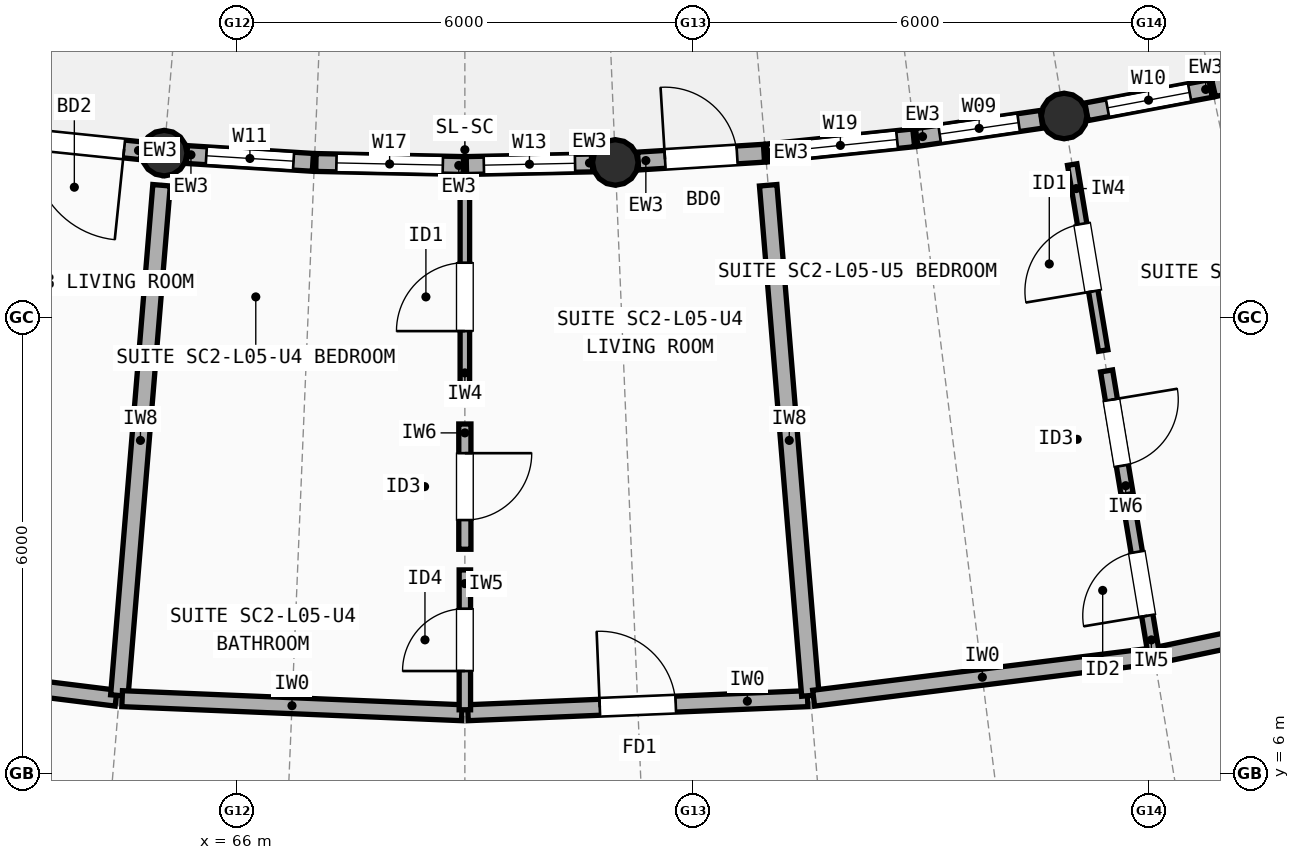
"""IFC4 building model, lengths in metres.
Left out: names, types, materials, properties, quantities, classifications, styles, units other than length and angle.
Written with IfcOpenShell. Run it as: python <this file> out.ifc"""

import sys

from ifc_helpers import new_model, si_unit, direction, frame, frame_2d, origin, origin_2d, place, context, subcontext, project, spatial, rectangle, circle, extrude, element, fill, save


model = new_model("IFC4")
c1 = context("Model", 3, precision=1e-05, world=origin(), true_north=direction((0.0, 1.0)))
c2 = subcontext(c1, "Body", "Model", "MODEL_VIEW")
j1 = project(units=[si_unit("LENGTHUNIT", "METRE"), si_unit("PLANEANGLEUNIT", "RADIAN")], contexts=[c1])
p1 = place(None, origin())
s1 = spatial("IfcSite", under=j1, at=p1, CompositionType="ELEMENT")
p2 = place(p1, origin())
s2 = spatial("IfcBuilding", under=s1, at=p2, CompositionType="ELEMENT")
p3 = place(p2, frame((0.0, 0.0, 17.3)))
s3 = spatial("IfcBuildingStorey", under=s2, at=p3, CompositionType="ELEMENT", Elevation=17.3)
for number, where, z_axis, x_axis in (
    (1, (65.044, 14.163, 0.0), (0.0, 0.0, 1.0), (1.0, 0.0, 0.0)),
    (2, (70.979, 14.041, 0.0), (0.0, 0.0, 1.0), (1.0, 0.0, 0.0)),
    (3, (76.885, 14.652, 0.0), (0.0, 0.0, 1.0), (1.0, 0.0, 0.0)),
):
    element("IfcColumn", number, at=place(p3, frame(where, z_axis=z_axis, x_axis=x_axis)), inside=s3, PredefinedType="COLUMN", context=c2, shape_type="SweptSolid", body=[
        extrude(circle(Radius=0.3, at=origin_2d()), origin(), (0.0, 0.0, 1.0), 2.94),
    ])
p4 = place(p3, frame((63.094, 14.365, 0.0), z_axis=(0.0, 0.0, 1.0), x_axis=(0.994687640844, -0.102939288674, 0.0)))
e4 = element("IfcWall", 4, at=p4, inside=s3, PredefinedType="STANDARD", context=c2, shape_type="SweptSolid", body=[
    extrude(rectangle(XDim=1.66, YDim=0.235, at=frame_2d((0.83, 0.0))), origin(), (0.0, 0.0, 1.0), 2.676),
])
p5 = place(p4, frame((0.23, 0.0, 0.0)))
e5 = element("IfcOpeningElement", 5, at=p5, cuts=e4, PredefinedType="OPENING", context=c2, shape_type="SweptSolid", body=[
    extrude(rectangle(XDim=1.2, YDim=2.15, at=frame_2d((0.6, 1.075))), frame((0.0, 0.127, 0.0), z_axis=(0.0, -1.0, 0.0), x_axis=(1.0, 0.0, 0.0)), (0.0, 0.0, 1.0), 0.255),
])
p6 = place(p3, frame((65.344, 14.145, 0.0), z_axis=(0.0, 0.0, 1.0), x_axis=(0.998081651949, -0.061911356339, 0.0)))
e6 = element("IfcWall", 6, at=p6, inside=s3, PredefinedType="STANDARD", context=c2, shape_type="SweptSolid", body=[
    extrude(rectangle(XDim=1.66, YDim=0.235, at=frame_2d((0.83, 0.0))), origin(), (0.0, 0.0, 1.0), 2.676),
])
p7 = place(p6, frame((0.255, 0.0, 0.85)))
e7 = element("IfcOpeningElement", 7, at=p7, cuts=e6, PredefinedType="OPENING", context=c2, shape_type="SweptSolid", body=[
    extrude(rectangle(XDim=1.15, YDim=1.45, at=frame_2d((0.575, 0.725))), frame((0.0, 0.127, 0.0), z_axis=(0.0, -1.0, 0.0), x_axis=(1.0, 0.0, 0.0)), (0.0, 0.0, 1.0), 0.255),
])
p8 = place(p3, frame((67.04, 14.04, 0.0), z_axis=(0.0, 0.0, 1.0), x_axis=(0.999789612304, -0.020511731505, 0.0)))
e8 = element("IfcWall", 8, at=p8, inside=s3, PredefinedType="STANDARD", context=c2, shape_type="SweptSolid", body=[
    extrude(rectangle(XDim=1.94, YDim=0.235, at=frame_2d((0.97, 0.0))), origin(), (0.0, 0.0, 1.0), 2.676),
])
p9 = place(p8, frame((0.27, 0.0, 0.85)))
e9 = element("IfcOpeningElement", 9, at=p9, cuts=e8, PredefinedType="OPENING", context=c2, shape_type="SweptSolid", body=[
    extrude(rectangle(XDim=1.4, YDim=1.5, at=frame_2d((0.7, 0.75))), frame((0.0, 0.127, 0.0), z_axis=(0.0, -1.0, 0.0), x_axis=(1.0, 0.0, 0.0)), (0.0, 0.0, 1.0), 0.255),
])
p10 = place(p3, frame((69.02, 14.0, 0.0), z_axis=(0.0, 0.0, 1.0), x_axis=(0.999788004991, 0.020589926552, 0.0)))
e10 = element("IfcWall", 10, at=p10, inside=s3, PredefinedType="STANDARD", context=c2, shape_type="SweptSolid", body=[
    extrude(rectangle(XDim=1.66, YDim=0.235, at=frame_2d((0.83, 0.0))), origin(), (0.0, 0.0, 1.0), 2.676),
])
p11 = place(p10, frame((0.23, 0.0, 0.85)))
e11 = element("IfcOpeningElement", 11, at=p11, cuts=e10, PredefinedType="OPENING", context=c2, shape_type="SweptSolid", body=[
    extrude(rectangle(XDim=1.2, YDim=1.45, at=frame_2d((0.6, 0.725))), frame((0.0, 0.127, 0.0), z_axis=(0.0, -1.0, 0.0), x_axis=(1.0, 0.0, 0.0)), (0.0, 0.0, 1.0), 0.255),
])
p12 = place(p3, frame((71.279, 14.059, 0.0), z_axis=(0.0, 0.0, 1.0), x_axis=(0.998081088149, 0.061920444756, 0.0)))
e12 = element("IfcWall", 12, at=p12, inside=s3, PredefinedType="STANDARD", context=c2, shape_type="SweptSolid", body=[
    extrude(rectangle(XDim=1.66, YDim=0.235, at=frame_2d((0.83, 0.0))), origin(), (0.0, 0.0, 1.0), 2.676),
])
p13 = place(p12, frame((0.355, 0.0, 0.0)))
e13 = element("IfcOpeningElement", 13, at=p13, cuts=e12, PredefinedType="OPENING", context=c2, shape_type="SweptSolid", body=[
    extrude(rectangle(XDim=0.95, YDim=2.12, at=frame_2d((0.475, 1.06))), frame((0.0, 0.127, 0.0), z_axis=(0.0, -1.0, 0.0), x_axis=(1.0, 0.0, 0.0)), (0.0, 0.0, 1.0), 0.255),
])
p14 = place(p3, frame((72.976, 14.165, 0.0), z_axis=(0.0, 0.0, 1.0), x_axis=(0.994688684624, 0.10292920228, 0.0)))
e14 = element("IfcWall", 14, at=p14, inside=s3, PredefinedType="STANDARD", context=c2, shape_type="SweptSolid", body=[
    extrude(rectangle(XDim=1.94, YDim=0.235, at=frame_2d((0.97, 0.0))), origin(), (0.0, 0.0, 1.0), 2.676),
])
p15 = place(p14, frame((0.22, 0.0, 0.85)))
e15 = element("IfcOpeningElement", 15, at=p15, cuts=e14, PredefinedType="OPENING", context=c2, shape_type="SweptSolid", body=[
    extrude(rectangle(XDim=1.5, YDim=1.5, at=frame_2d((0.75, 0.75))), frame((0.0, 0.127, 0.0), z_axis=(0.0, -1.0, 0.0), x_axis=(1.0, 0.0, 0.0)), (0.0, 0.0, 1.0), 0.255),
])
p16 = place(p3, frame((74.945, 14.37, 0.0), z_axis=(0.0, 0.0, 1.0), x_axis=(0.989602429917, 0.14382986721, 0.0)))
e16 = element("IfcWall", 16, at=p16, inside=s3, PredefinedType="STANDARD", context=c2, shape_type="SweptSolid", body=[
    extrude(rectangle(XDim=1.66, YDim=0.235, at=frame_2d((0.83, 0.0))), origin(), (0.0, 0.0, 1.0), 2.676),
])
p17 = place(p16, frame((0.305, 0.0, 0.85)))
e17 = element("IfcOpeningElement", 17, at=p17, cuts=e16, PredefinedType="OPENING", context=c2, shape_type="SweptSolid", body=[
    extrude(rectangle(XDim=1.05, YDim=1.35, at=frame_2d((0.525, 0.675))), frame((0.0, 0.127, 0.0), z_axis=(0.0, -1.0, 0.0), x_axis=(1.0, 0.0, 0.0)), (0.0, 0.0, 1.0), 0.255),
])
p18 = place(p3, frame((77.179, 14.708, 0.0), z_axis=(0.0, 0.0, 1.0), x_axis=(0.982820537681, 0.184563784945, 0.0)))
e18 = element("IfcWall", 18, at=p18, inside=s3, PredefinedType="STANDARD", context=c2, shape_type="SweptSolid", body=[
    extrude(rectangle(XDim=1.66, YDim=0.235, at=frame_2d((0.83, 0.0))), origin(), (0.0, 0.0, 1.0), 2.676),
])
p19 = place(p18, frame((0.28, 0.0, 0.85)))
e19 = element("IfcOpeningElement", 19, at=p19, cuts=e18, PredefinedType="OPENING", context=c2, shape_type="SweptSolid", body=[
    extrude(rectangle(XDim=1.1, YDim=1.45, at=frame_2d((0.55, 0.725))), frame((0.0, 0.127, 0.0), z_axis=(0.0, -1.0, 0.0), x_axis=(1.0, 0.0, 0.0)), (0.0, 0.0, 1.0), 0.255),
])
p20 = place(p3, frame((78.85, 15.022, 0.0), z_axis=(0.0, 0.0, 1.0), x_axis=(0.974359373104, 0.224997360081, 0.0)))
e20 = element("IfcWall", 20, at=p20, inside=s3, PredefinedType="STANDARD", context=c2, shape_type="SweptSolid", body=[
    extrude(rectangle(XDim=1.94, YDim=0.235, at=frame_2d((0.97, 0.0))), origin(), (0.0, 0.0, 1.0), 2.676),
])
p21 = place(p20, frame((0.47, 0.0, 0.0)))
e21 = element("IfcOpeningElement", 21, at=p21, cuts=e20, PredefinedType="OPENING", context=c2, shape_type="SweptSolid", body=[
    extrude(rectangle(XDim=1.0, YDim=2.15, at=frame_2d((0.5, 1.075))), frame((0.0, 0.127, 0.0), z_axis=(0.0, -1.0, 0.0), x_axis=(1.0, 0.0, 0.0)), (0.0, 0.0, 1.0), 0.255),
])
p22 = place(p3, frame((59.972, 7.545, 0.0), z_axis=(0.0, 0.0, 1.0), x_axis=(0.992349920368, -0.123457019023, 0.0)))
e22 = element("IfcWall", 22, at=p22, inside=s3, PredefinedType="SOLIDWALL", context=c2, shape_type="SweptSolid", body=[
    extrude(rectangle(XDim=4.473, YDim=0.21, at=frame_2d((2.237, 0.0))), origin(), (0.0, 0.0, 1.0), 2.714),
])
p23 = place(p22, frame((1.712, 0.0, 0.0)))
e23 = element("IfcOpeningElement", 23, at=p23, cuts=e22, PredefinedType="OPENING", context=c2, shape_type="SweptSolid", body=[
    extrude(rectangle(XDim=1.05, YDim=2.15, at=frame_2d((0.525, 1.075))), frame((0.0, 0.115, 0.0), z_axis=(0.0, -1.0, 0.0), x_axis=(1.0, 0.0, 0.0)), (0.0, 0.0, 1.0), 0.23),
])
p24 = place(p3, frame((65.009, 13.741, 0.0), z_axis=(0.0, 0.0, 1.0), x_axis=(-0.082418569382, -0.996597802236, 0.0)))
e24 = element("IfcWall", 24, at=p24, inside=s3, PredefinedType="SOLIDWALL", context=c2, shape_type="SweptSolid", body=[
    extrude(rectangle(XDim=6.736, YDim=0.23, at=frame_2d((3.368, 0.0))), origin(), (0.0, 0.0, 1.0), 2.734),
])
p25 = place(p3, frame((64.491, 6.986, 0.0), z_axis=(0.0, 0.0, 1.0), x_axis=(0.999148329529, -0.041262762871, 0.0)))
e25 = element("IfcWall", 25, at=p25, inside=s3, PredefinedType="SOLIDWALL", context=c2, shape_type="SweptSolid", body=[
    extrude(rectangle(XDim=4.473, YDim=0.21, at=frame_2d((2.237, 0.0))), origin(), (0.0, 0.0, 1.0), 2.754),
])
p26 = place(p3, frame((69.04, 6.802, 0.0), z_axis=(0.0, 0.0, 1.0), x_axis=(0.999148329529, 0.041262762871, 0.0)))
e26 = element("IfcWall", 26, at=p26, inside=s3, PredefinedType="SOLIDWALL", context=c2, shape_type="SweptSolid", body=[
    extrude(rectangle(XDim=4.473, YDim=0.21, at=frame_2d((2.237, 0.0))), origin(), (0.0, 0.0, 1.0), 2.734),
])
p27 = place(p26, frame((1.737, 0.0, 0.0)))
e27 = element("IfcOpeningElement", 27, at=p27, cuts=e26, PredefinedType="OPENING", context=c2, shape_type="SweptSolid", body=[
    extrude(rectangle(XDim=1.0, YDim=2.15, at=frame_2d((0.5, 1.075))), frame((0.0, 0.115, 0.0), z_axis=(0.0, -1.0, 0.0), x_axis=(1.0, 0.0, 0.0)), (0.0, 0.0, 1.0), 0.23),
])
p28 = place(p3, frame((69.0, 13.672, 0.0), z_axis=(0.0, 0.0, 1.0), x_axis=(0.0, -1.0, 0.0)))
e28 = element("IfcWall", 28, at=p28, inside=s3, PredefinedType="PARTITIONING", context=c2, shape_type="SweptSolid", body=[
    extrude(rectangle(XDim=2.8, YDim=0.125, at=frame_2d((1.4, 0.0))), origin(), (0.0, 0.0, 1.0), 2.714),
])
p29 = place(p28, frame((0.95, 0.0, 0.0)))
e29 = element("IfcOpeningElement", 29, at=p29, cuts=e28, PredefinedType="OPENING", context=c2, shape_type="SweptSolid", body=[
    extrude(rectangle(XDim=0.9, YDim=2.1, at=frame_2d((0.45, 1.05))), frame((0.0, 0.073, 0.0), z_axis=(0.0, -1.0, 0.0), x_axis=(1.0, 0.0, 0.0)), (0.0, 0.0, 1.0), 0.145),
])
p30 = place(p3, frame((69.0, 10.6, 0.0), z_axis=(0.0, 0.0, 1.0), x_axis=(0.0, -1.0, 0.0)))
e30 = element("IfcWall", 30, at=p30, inside=s3, PredefinedType="PLUMBINGWALL", context=c2, shape_type="SweptSolid", body=[
    extrude(rectangle(XDim=1.648, YDim=0.16, at=frame_2d((0.824, 0.0))), origin(), (0.0, 0.0, 1.0), 2.714),
])
p31 = place(p30, frame((0.384, 0.0, 0.0)))
e31 = element("IfcOpeningElement", 31, at=p31, cuts=e30, PredefinedType="OPENING", context=c2, shape_type="SweptSolid", body=[
    extrude(rectangle(XDim=0.88, YDim=2.1, at=frame_2d((0.44, 1.05))), frame((0.0, 0.09, 0.0), z_axis=(0.0, -1.0, 0.0), x_axis=(1.0, 0.0, 0.0)), (0.0, 0.0, 1.0), 0.18),
])
p32 = place(p3, frame((69.0, 8.68, 0.0), z_axis=(0.0, 0.0, 1.0), x_axis=(0.0, -1.0, 0.0)))
e32 = element("IfcWall", 32, at=p32, inside=s3, PredefinedType="PARTITIONING", context=c2, shape_type="SweptSolid", body=[
    extrude(rectangle(XDim=1.84, YDim=0.15, at=frame_2d((0.92, 0.0))), origin(), (0.0, 0.0, 1.0), 2.714),
])
p33 = place(p32, frame((0.51, 0.0, 0.0)))
e33 = element("IfcOpeningElement", 33, at=p33, cuts=e32, PredefinedType="OPENING", context=c2, shape_type="SweptSolid", body=[
    extrude(rectangle(XDim=0.82, YDim=2.08, at=frame_2d((0.41, 1.04))), frame((0.0, 0.085, 0.0), z_axis=(0.0, -1.0, 0.0), x_axis=(1.0, 0.0, 0.0)), (0.0, 0.0, 1.0), 0.17),
])
p34 = place(p3, frame((72.991, 13.741, 0.0), z_axis=(0.0, 0.0, 1.0), x_axis=(0.082418569382, -0.996597802236, 0.0)))
e34 = element("IfcWall", 34, at=p34, inside=s3, PredefinedType="SOLIDWALL", context=c2, shape_type="SweptSolid", body=[
    extrude(rectangle(XDim=6.736, YDim=0.23, at=frame_2d((3.368, 0.0))), origin(), (0.0, 0.0, 1.0), 2.754),
])
p35 = place(p3, frame((73.589, 6.993, 0.0), z_axis=(0.0, 0.0, 1.0), x_axis=(0.992349088432, 0.123463705959, 0.0)))
e35 = element("IfcWall", 35, at=p35, inside=s3, PredefinedType="SOLIDWALL", context=c2, shape_type="SweptSolid", body=[
    extrude(rectangle(XDim=4.473, YDim=0.21, at=frame_2d((2.236, 0.0))), origin(), (0.0, 0.0, 1.0), 2.714),
])
p36 = place(p3, frame((78.107, 7.558, 0.0), z_axis=(0.0, 0.0, 1.0), x_axis=(0.978806148413, 0.204788973894, 0.0)))
e36 = element("IfcWall", 36, at=p36, inside=s3, PredefinedType="SOLIDWALL", context=c2, shape_type="SweptSolid", body=[
    extrude(rectangle(XDim=4.473, YDim=0.21, at=frame_2d((2.236, 0.0))), origin(), (0.0, 0.0, 1.0), 2.754),
])
p37 = place(p36, frame((1.747, 0.0, 0.0)))
e37 = element("IfcOpeningElement", 37, at=p37, cuts=e36, PredefinedType="OPENING", context=c2, shape_type="SweptSolid", body=[
    extrude(rectangle(XDim=0.98, YDim=2.15, at=frame_2d((0.49, 1.075))), frame((0.0, 0.115, 0.0), z_axis=(0.0, -1.0, 0.0), x_axis=(1.0, 0.0, 0.0)), (0.0, 0.0, 1.0), 0.23),
])
p38 = place(p3, frame((76.991, 14.013, 0.0), z_axis=(0.0, 0.0, 1.0), x_axis=(0.16420741421, -0.986425833562, 0.0)))
e38 = element("IfcWall", 38, at=p38, inside=s3, PredefinedType="PARTITIONING", context=c2, shape_type="SweptSolid", body=[
    extrude(rectangle(XDim=2.48, YDim=0.125, at=frame_2d((1.24, 0.0))), origin(), (0.0, 0.0, 1.0), 2.734),
])
p39 = place(p38, frame((0.79, 0.0, 0.0)))
e39 = element("IfcOpeningElement", 39, at=p39, cuts=e38, PredefinedType="OPENING", context=c2, shape_type="SweptSolid", body=[
    extrude(rectangle(XDim=0.9, YDim=2.1, at=frame_2d((0.45, 1.05))), frame((0.0, 0.073, 0.0), z_axis=(0.0, -1.0, 0.0), x_axis=(1.0, 0.0, 0.0)), (0.0, 0.0, 1.0), 0.145),
])
p40 = place(p3, frame((77.443, 11.298, 0.0), z_axis=(0.0, 0.0, 1.0), x_axis=(0.164158726706, -0.986433937193, 0.0)))
e40 = element("IfcWall", 40, at=p40, inside=s3, PredefinedType="PLUMBINGWALL", context=c2, shape_type="SweptSolid", body=[
    extrude(rectangle(XDim=1.648, YDim=0.16, at=frame_2d((0.824, 0.0))), origin(), (0.0, 0.0, 1.0), 2.734),
])
p41 = place(p40, frame((0.384, 0.0, 0.0)))
e41 = element("IfcOpeningElement", 41, at=p41, cuts=e40, PredefinedType="OPENING", context=c2, shape_type="SweptSolid", body=[
    extrude(rectangle(XDim=0.88, YDim=2.1, at=frame_2d((0.44, 1.05))), frame((0.0, 0.09, 0.0), z_axis=(0.0, -1.0, 0.0), x_axis=(1.0, 0.0, 0.0)), (0.0, 0.0, 1.0), 0.18),
])
p42 = place(p3, frame((77.759, 9.404, 0.0), z_axis=(0.0, 0.0, 1.0), x_axis=(0.164269882379, -0.986415432636, 0.0)))
e42 = element("IfcWall", 42, at=p42, inside=s3, PredefinedType="PARTITIONING", context=c2, shape_type="SweptSolid", body=[
    extrude(rectangle(XDim=1.84, YDim=0.15, at=frame_2d((0.92, 0.0))), origin(), (0.0, 0.0, 1.0), 2.734),
])
p43 = place(p42, frame((0.495, 0.0, 0.0)))
e43 = element("IfcOpeningElement", 43, at=p43, cuts=e42, PredefinedType="OPENING", context=c2, shape_type="SweptSolid", body=[
    extrude(rectangle(XDim=0.85, YDim=2.1, at=frame_2d((0.425, 1.05))), frame((0.0, 0.085, 0.0), z_axis=(0.0, -1.0, 0.0), x_axis=(1.0, 0.0, 0.0)), (0.0, 0.0, 1.0), 0.17),
])
p44 = place(p5, origin())
e44 = element("IfcDoor", 44, at=p44, inside=s3, OperationType="SINGLE_SWING_RIGHT", PredefinedType="DOOR", context=c2, shape_type="SweptSolid", body=[
    extrude(rectangle(XDim=1.2, YDim=2.15, at=frame_2d((0.6, 1.075))), frame((0.0, 0.025, 0.0), z_axis=(0.0, -1.0, 0.0), x_axis=(1.0, 0.0, 0.0)), (0.0, 0.0, 1.0), 0.05),
])
fill(e5, e44)
p45 = place(p7, origin())
e45 = element("IfcWindow", 45, at=p45, inside=s3, PartitioningType="SINGLE_PANEL", PredefinedType="WINDOW", context=c2, shape_type="SweptSolid", body=[
    extrude(rectangle(XDim=1.15, YDim=1.45, at=frame_2d((0.575, 0.725))), frame((0.0, 0.03, 0.0), z_axis=(0.0, -1.0, 0.0), x_axis=(1.0, 0.0, 0.0)), (0.0, 0.0, 1.0), 0.06),
])
fill(e7, e45)
p46 = place(p9, origin())
e46 = element("IfcWindow", 46, at=p46, inside=s3, PartitioningType="SINGLE_PANEL", PredefinedType="WINDOW", context=c2, shape_type="SweptSolid", body=[
    extrude(rectangle(XDim=1.4, YDim=1.5, at=frame_2d((0.7, 0.75))), frame((0.0, 0.03, 0.0), z_axis=(0.0, -1.0, 0.0), x_axis=(1.0, 0.0, 0.0)), (0.0, 0.0, 1.0), 0.06),
])
fill(e9, e46)
p47 = place(p11, origin())
e47 = element("IfcWindow", 47, at=p47, inside=s3, PartitioningType="SINGLE_PANEL", PredefinedType="WINDOW", context=c2, shape_type="SweptSolid", body=[
    extrude(rectangle(XDim=1.2, YDim=1.45, at=frame_2d((0.6, 0.725))), frame((0.0, 0.03, 0.0), z_axis=(0.0, -1.0, 0.0), x_axis=(1.0, 0.0, 0.0)), (0.0, 0.0, 1.0), 0.06),
])
fill(e11, e47)
p48 = place(p13, origin())
e48 = element("IfcDoor", 48, at=p48, inside=s3, OperationType="SINGLE_SWING_LEFT", PredefinedType="DOOR", context=c2, shape_type="SweptSolid", body=[
    extrude(rectangle(XDim=0.95, YDim=2.12, at=frame_2d((0.475, 1.06))), frame((0.0, 0.025, 0.0), z_axis=(0.0, -1.0, 0.0), x_axis=(1.0, 0.0, 0.0)), (0.0, 0.0, 1.0), 0.05),
])
fill(e13, e48)
p49 = place(p15, origin())
e49 = element("IfcWindow", 49, at=p49, inside=s3, PartitioningType="SINGLE_PANEL", PredefinedType="WINDOW", context=c2, shape_type="SweptSolid", body=[
    extrude(rectangle(XDim=1.5, YDim=1.5, at=frame_2d((0.75, 0.75))), frame((0.0, 0.03, 0.0), z_axis=(0.0, -1.0, 0.0), x_axis=(1.0, 0.0, 0.0)), (0.0, 0.0, 1.0), 0.06),
])
fill(e15, e49)
p50 = place(p17, origin())
e50 = element("IfcWindow", 50, at=p50, inside=s3, PartitioningType="SINGLE_PANEL", PredefinedType="WINDOW", context=c2, shape_type="SweptSolid", body=[
    extrude(rectangle(XDim=1.05, YDim=1.35, at=frame_2d((0.525, 0.675))), frame((0.0, 0.03, 0.0), z_axis=(0.0, -1.0, 0.0), x_axis=(1.0, 0.0, 0.0)), (0.0, 0.0, 1.0), 0.06),
])
fill(e17, e50)
p51 = place(p19, origin())
e51 = element("IfcWindow", 51, at=p51, inside=s3, PartitioningType="SINGLE_PANEL", PredefinedType="WINDOW", context=c2, shape_type="SweptSolid", body=[
    extrude(rectangle(XDim=1.1, YDim=1.45, at=frame_2d((0.55, 0.725))), frame((0.0, 0.03, 0.0), z_axis=(0.0, -1.0, 0.0), x_axis=(1.0, 0.0, 0.0)), (0.0, 0.0, 1.0), 0.06),
])
fill(e19, e51)
p52 = place(p27, origin())
e52 = element("IfcDoor", 52, at=p52, inside=s3, OperationType="SINGLE_SWING_LEFT", PredefinedType="DOOR", context=c2, shape_type="SweptSolid", body=[
    extrude(rectangle(XDim=1.0, YDim=2.15, at=frame_2d((0.5, 1.075))), frame((0.0, 0.025, 0.0), z_axis=(0.0, -1.0, 0.0), x_axis=(1.0, 0.0, 0.0)), (0.0, 0.0, 1.0), 0.05),
])
fill(e27, e52)
p53 = place(p29, origin())
e53 = element("IfcDoor", 53, at=p53, inside=s3, OperationType="SINGLE_SWING_RIGHT", PredefinedType="DOOR", context=c2, shape_type="SweptSolid", body=[
    extrude(rectangle(XDim=0.9, YDim=2.1, at=frame_2d((0.45, 1.05))), frame((0.0, 0.025, 0.0), z_axis=(0.0, -1.0, 0.0), x_axis=(1.0, 0.0, 0.0)), (0.0, 0.0, 1.0), 0.05),
])
fill(e29, e53)
p54 = place(p31, origin())
e54 = element("IfcDoor", 54, at=p54, inside=s3, OperationType="SINGLE_SWING_LEFT", PredefinedType="DOOR", context=c2, shape_type="SweptSolid", body=[
    extrude(rectangle(XDim=0.88, YDim=2.1, at=frame_2d((0.44, 1.05))), frame((0.0, 0.025, 0.0), z_axis=(0.0, -1.0, 0.0), x_axis=(1.0, 0.0, 0.0)), (0.0, 0.0, 1.0), 0.05),
])
fill(e31, e54)
p55 = place(p33, origin())
e55 = element("IfcDoor", 55, at=p55, inside=s3, OperationType="SINGLE_SWING_RIGHT", PredefinedType="DOOR", context=c2, shape_type="SweptSolid", body=[
    extrude(rectangle(XDim=0.82, YDim=2.08, at=frame_2d((0.41, 1.04))), frame((0.0, 0.025, 0.0), z_axis=(0.0, -1.0, 0.0), x_axis=(1.0, 0.0, 0.0)), (0.0, 0.0, 1.0), 0.05),
])
fill(e33, e55)
p56 = place(p39, origin())
e56 = element("IfcDoor", 56, at=p56, inside=s3, OperationType="SINGLE_SWING_RIGHT", PredefinedType="DOOR", context=c2, shape_type="SweptSolid", body=[
    extrude(rectangle(XDim=0.9, YDim=2.1, at=frame_2d((0.45, 1.05))), frame((0.0, 0.025, 0.0), z_axis=(0.0, -1.0, 0.0), x_axis=(1.0, 0.0, 0.0)), (0.0, 0.0, 1.0), 0.05),
])
fill(e39, e56)
p57 = place(p41, origin())
e57 = element("IfcDoor", 57, at=p57, inside=s3, OperationType="SINGLE_SWING_LEFT", PredefinedType="DOOR", context=c2, shape_type="SweptSolid", body=[
    extrude(rectangle(XDim=0.88, YDim=2.1, at=frame_2d((0.44, 1.05))), frame((0.0, 0.025, 0.0), z_axis=(0.0, -1.0, 0.0), x_axis=(1.0, 0.0, 0.0)), (0.0, 0.0, 1.0), 0.05),
])
fill(e41, e57)
p58 = place(p43, origin())
e58 = element("IfcDoor", 58, at=p58, inside=s3, OperationType="SINGLE_SWING_RIGHT", PredefinedType="DOOR", context=c2, shape_type="SweptSolid", body=[
    extrude(rectangle(XDim=0.85, YDim=2.1, at=frame_2d((0.425, 1.05))), frame((0.0, 0.025, 0.0), z_axis=(0.0, -1.0, 0.0), x_axis=(1.0, 0.0, 0.0)), (0.0, 0.0, 1.0), 0.05),
])
fill(e43, e58)
save(model, sys.argv[1])
